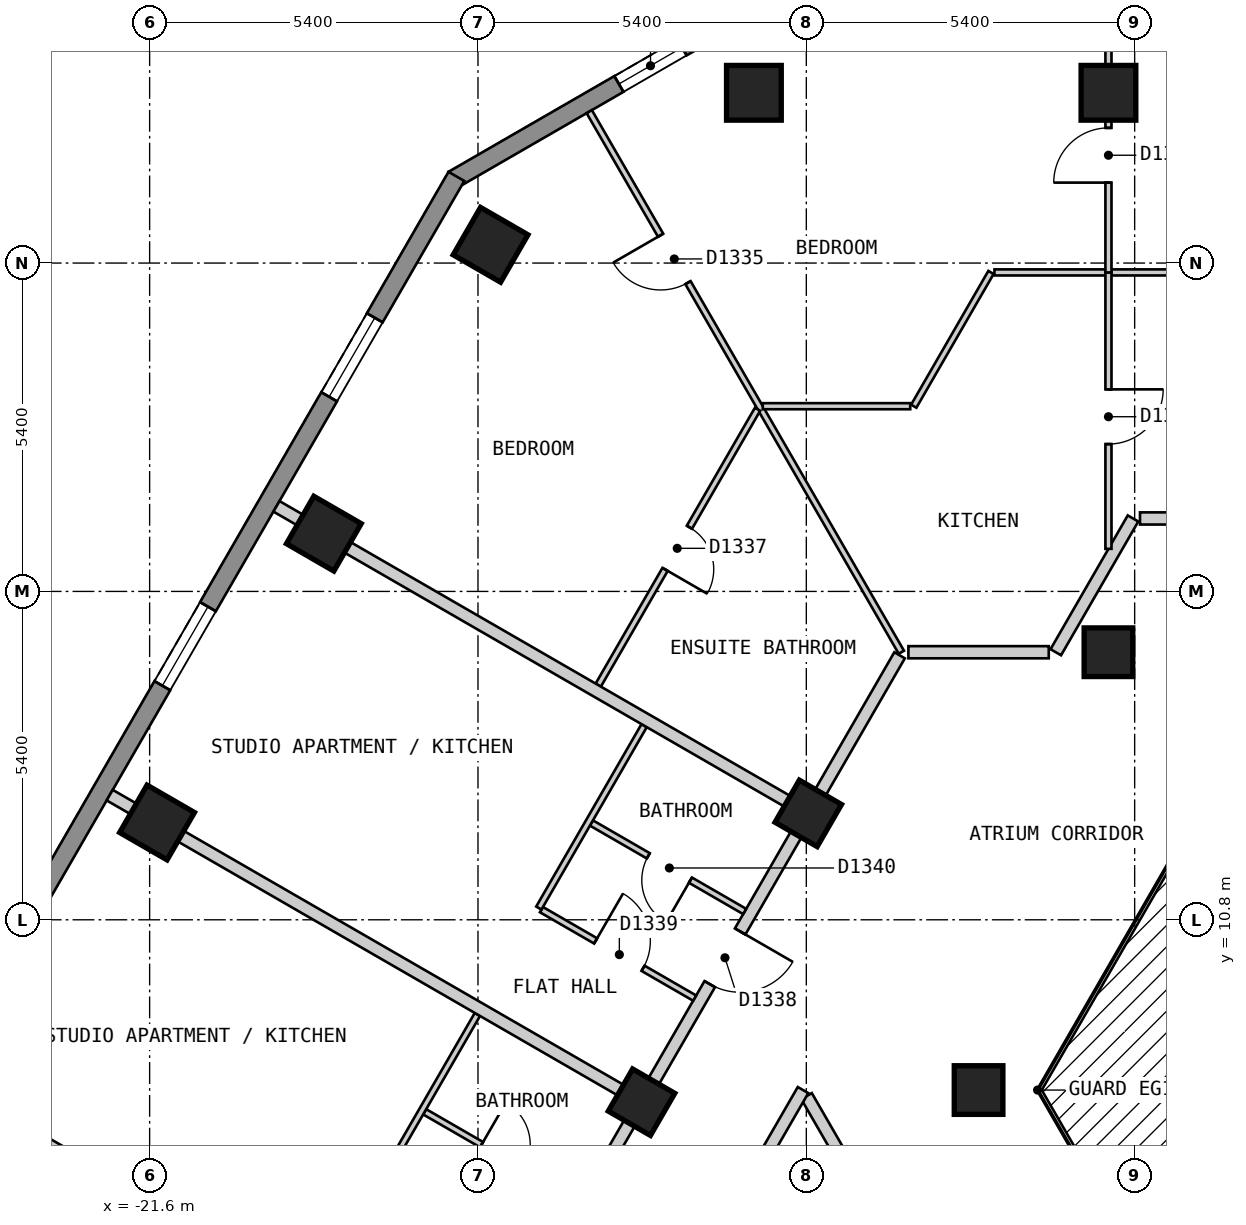
"""IFC4 building model, lengths in metres.
Left out: names, types, materials, properties, quantities, classifications, styles, units other than length and angle.
Written with IfcOpenShell. Run it as: python <this file> out.ifc"""

import sys

from ifc_helpers import new_model, si_unit, direction, frame, frame_2d, origin, origin_2d, place, context, subcontext, project, spatial, polyline, rectangle, outline, extrude, element, fill, save


model = new_model("IFC4")
c1 = context("Model", 3, precision=1e-05, world=origin(), true_north=direction((0.0, 1.0)))
c2 = subcontext(c1, "Body", "Model", "MODEL_VIEW")
j1 = project(units=[si_unit("LENGTHUNIT", "METRE"), si_unit("PLANEANGLEUNIT", "RADIAN")], contexts=[c1])
p1 = place(None, origin())
s1 = spatial("IfcSite", under=j1, at=p1, CompositionType="ELEMENT")
p2 = place(p1, origin())
s2 = spatial("IfcBuilding", under=s1, at=p2, CompositionType="ELEMENT")
p3 = place(p2, frame((0.0, 0.0, 147.6)))
s3 = spatial("IfcBuildingStorey", under=s2, at=p3, CompositionType="ELEMENT", Elevation=147.6)
for number, where, z_axis, x_axis in (
    (1, (-5.831, 24.4, 0.0), (0.0, 0.0, 1.0), (-1.0, 0.0, 0.0)),
    (2, (-11.662, 24.4, 0.0), (0.0, 0.0, 1.0), (-1.0, 0.0, 0.0)),
    (3, (-15.993, 21.9, 0.0), (0.0, 0.0, 1.0), (-0.5, -0.866, 0.0)),
    (4, (-18.735, 17.15, 0.0), (0.0, 0.0, 1.0), (-0.5, -0.866, 0.0)),
    (5, (-21.478, 12.4, 0.0), (0.0, 0.0, 1.0), (-0.5, -0.866, 0.0)),
):
    element("IfcColumn", number, at=place(p3, frame(where, z_axis=z_axis, x_axis=x_axis)), inside=s3, PredefinedType="COLUMN", context=c2, shape_type="SweptSolid", body=[
        extrude(rectangle(XDim=0.9, YDim=0.9, at=origin_2d()), origin(), (0.0, 0.0, 1.0), 3.0),
    ])
for number, where, z_axis, x_axis in (
    (6, (-5.831, 15.2, 0.0), (0.0, 0.0, 1.0), (-1.0, 0.0, 0.0)),
    (7, (-10.768, 12.55, 0.0), (0.0, 0.0, 1.0), (-0.5, -0.866, 0.0)),
    (8, (-7.967, 8.0, 0.0), (0.0, 0.0, 1.0), (1.0, 0.0, 0.0)),
    (9, (-13.51, 7.8, 0.0), (0.0, 0.0, 1.0), (-0.5, -0.866, 0.0)),
):
    element("IfcColumn", number, at=place(p3, frame(where, z_axis=z_axis, x_axis=x_axis)), inside=s3, PredefinedType="COLUMN", context=c2, shape_type="SweptSolid", body=[
        extrude(rectangle(XDim=0.8, YDim=0.8, at=origin_2d()), origin(), (0.0, 0.0, 1.0), 3.0),
    ])
p4 = place(p3, frame((-12.28, 25.47, 0.0), z_axis=(0.0, 0.0, 1.0), x_axis=(-0.866022959057, -0.500004234368, 0.0)))
e10 = element("IfcWall", 10, at=p4, inside=s3, PredefinedType="SOLIDWALL", context=c2, shape_type="SweptSolid", body=[
    extrude(outline(polyline([(0.0, -0.15), (5.0, -0.15), (4.92, 0.15), (0.08, 0.15), (0.0, -0.15)])), origin(), (0.0, 0.0, 1.0), 2.7),
])
p5 = place(p4, frame((0.65, 0.0, 0.15)))
e11 = element("IfcOpeningElement", 11, at=p5, cuts=e10, PredefinedType="OPENING", context=c2, shape_type="SweptSolid", body=[
    extrude(rectangle(XDim=1.2, YDim=2.1, at=frame_2d((0.6, 1.05))), frame((0.0, 0.16, 0.0), z_axis=(0.0, -1.0, 0.0), x_axis=(1.0, 0.0, 0.0)), (0.0, 0.0, 1.0), 0.32),
])
p6 = place(p3, frame((-16.555, 23.025, 0.0), z_axis=(0.0, 0.0, 1.0), x_axis=(-0.500020536353, -0.866013546791, 0.0)))
e12 = element("IfcWall", 12, at=p6, inside=s3, PredefinedType="SOLIDWALL", context=c2, shape_type="SweptSolid", body=[
    extrude(outline(polyline([(0.0, -0.15), (23.325, -0.15), (23.245, 0.15), (0.08, 0.15), (0.0, -0.15)])), origin(), (0.0, 0.0, 1.0), 2.7),
])
p7 = place(p6, frame((2.685, 0.0, 0.15)))
e13 = element("IfcOpeningElement", 13, at=p7, cuts=e12, PredefinedType="OPENING", context=c2, shape_type="SweptSolid", body=[
    extrude(rectangle(XDim=1.5, YDim=2.1, at=frame_2d((0.75, 1.05))), frame((0.0, 0.16, 0.0), z_axis=(0.0, -1.0, 0.0), x_axis=(1.0, 0.0, 0.0)), (0.0, 0.0, 1.0), 0.32),
])
p8 = place(p6, frame((8.171, 0.0, 0.15)))
e14 = element("IfcOpeningElement", 14, at=p8, cuts=e12, PredefinedType="OPENING", context=c2, shape_type="SweptSolid", body=[
    extrude(rectangle(XDim=1.5, YDim=2.1, at=frame_2d((0.75, 1.05))), frame((0.0, 0.16, 0.0), z_axis=(0.0, -1.0, 0.0), x_axis=(1.0, 0.0, 0.0)), (0.0, 0.0, 1.0), 0.32),
])
p9 = place(p6, frame((13.655, 0.0, 0.15)))
e15 = element("IfcOpeningElement", 15, at=p9, cuts=e12, PredefinedType="OPENING", context=c2, shape_type="SweptSolid", body=[
    extrude(rectangle(XDim=1.5, YDim=2.1, at=frame_2d((0.75, 1.05))), frame((0.0, 0.16, 0.0), z_axis=(0.0, -1.0, 0.0), x_axis=(1.0, 0.0, 0.0)), (0.0, 0.0, 1.0), 0.32),
])
p10 = place(p6, frame((19.14, 0.0, 0.15)))
e16 = element("IfcOpeningElement", 16, at=p10, cuts=e12, PredefinedType="OPENING", context=c2, shape_type="SweptSolid", body=[
    extrude(rectangle(XDim=1.5, YDim=2.1, at=frame_2d((0.75, 1.05))), frame((0.0, 0.16, 0.0), z_axis=(0.0, -1.0, 0.0), x_axis=(1.0, 0.0, 0.0)), (0.0, 0.0, 1.0), 0.32),
])
p11 = place(p3, frame((-10.796, 7.9, 0.0), z_axis=(0.0, 0.0, 1.0), x_axis=(0.499954271211, -0.866051803703, 0.0)))
e17 = element("IfcWall", 17, at=p11, inside=s3, PredefinedType="PARTITIONING", context=c2, shape_type="SweptSolid", body=[
    extrude(rectangle(XDim=7.536, YDim=0.2, at=frame_2d((3.768, 0.0))), origin(), (0.0, 0.0, 1.0), 2.7),
])
p12 = place(p3, frame((-9.121, 15.2, 0.0), z_axis=(0.0, 0.0, 1.0), x_axis=(1.0, 0.0, 0.0)))
e18 = element("IfcWall", 18, at=p12, inside=s3, PredefinedType="PARTITIONING", context=c2, shape_type="SweptSolid", body=[
    extrude(rectangle(XDim=2.308, YDim=0.2, at=frame_2d((1.154, 0.0))), origin(), (0.0, 0.0, 1.0), 2.7),
])
p13 = place(p3, frame((-5.312, 17.4, 0.0), z_axis=(0.0, 0.0, 1.0), x_axis=(1.0, 0.0, 0.0)))
e19 = element("IfcWall", 19, at=p13, inside=s3, PredefinedType="PARTITIONING", context=c2, shape_type="SweptSolid", body=[
    extrude(rectangle(XDim=10.739, YDim=0.2, at=frame_2d((5.37, 0.0))), origin(), (0.0, 0.0, 1.0), 2.7),
])
p14 = place(p13, frame((1.896, 0.0, 0.0)))
e20 = element("IfcOpeningElement", 20, at=p14, cuts=e19, PredefinedType="OPENING", context=c2, shape_type="SweptSolid", body=[
    extrude(rectangle(XDim=1.0, YDim=2.1, at=frame_2d((0.5, 1.05))), frame((0.0, 0.11, 0.0), z_axis=(0.0, -1.0, 0.0), x_axis=(1.0, 0.0, 0.0)), (0.0, 0.0, 1.0), 0.22),
])
p15 = place(p3, frame((-15.242, 0.399, 0.0), z_axis=(0.0, 0.0, 1.0), x_axis=(0.499953615651, 0.866052182145, 0.0)))
e21 = element("IfcWall", 21, at=p15, inside=s3, PredefinedType="PARTITIONING", context=c2, shape_type="SweptSolid", body=[
    extrude(rectangle(XDim=8.777, YDim=0.2, at=frame_2d((4.388, 0.0))), origin(), (0.0, 0.0, 1.0), 2.7),
])
p16 = place(p15, frame((3.938, 0.0, 0.0)))
e22 = element("IfcOpeningElement", 22, at=p16, cuts=e21, PredefinedType="OPENING", context=c2, shape_type="SweptSolid", body=[
    extrude(rectangle(XDim=0.9, YDim=2.1, at=frame_2d((0.45, 1.05))), frame((0.0, 0.11, 0.0), z_axis=(0.0, -1.0, 0.0), x_axis=(1.0, 0.0, 0.0)), (0.0, 0.0, 1.0), 0.22),
])
p17 = place(p3, frame((-6.697, 15.2, 0.0), z_axis=(0.0, 0.0, 1.0), x_axis=(0.499963722229, 0.866046347752, 0.0)))
e23 = element("IfcWall", 23, at=p17, inside=s3, PredefinedType="PARTITIONING", context=c2, shape_type="SweptSolid", body=[
    extrude(rectangle(XDim=2.54, YDim=0.2, at=frame_2d((1.27, 0.0))), origin(), (0.0, 0.0, 1.0), 2.7),
])
p18 = place(p3, frame((-17.724, 0.5, 0.0), z_axis=(0.0, 0.0, 1.0), x_axis=(0.499994801602, 0.86602840506, 0.0)))
e24 = element("IfcWall", 24, at=p18, inside=s3, PredefinedType="PARTITIONING", context=c2, shape_type="SweptSolid", body=[
    extrude(rectangle(XDim=16.916, YDim=0.2, at=frame_2d((8.458, 0.0))), origin(), (0.0, 0.0, 1.0), 2.7),
])
p19 = place(p18, frame((10.672, 0.0, 0.0)))
e25 = element("IfcOpeningElement", 25, at=p19, cuts=e24, PredefinedType="OPENING", context=c2, shape_type="SweptSolid", body=[
    extrude(rectangle(XDim=1.0, YDim=2.1, at=frame_2d((0.5, 1.05))), frame((0.0, 0.11, 0.0), z_axis=(0.0, -1.0, 0.0), x_axis=(1.0, 0.0, 0.0)), (0.0, 0.0, 1.0), 0.22),
])
p20 = place(p18, frame((5.187, 0.0, 0.0)))
e26 = element("IfcOpeningElement", 26, at=p20, cuts=e24, PredefinedType="OPENING", context=c2, shape_type="SweptSolid", body=[
    extrude(rectangle(XDim=1.0, YDim=2.1, at=frame_2d((0.5, 1.05))), frame((0.0, 0.11, 0.0), z_axis=(0.0, -1.0, 0.0), x_axis=(1.0, 0.0, 0.0)), (0.0, 0.0, 1.0), 0.22),
])
p21 = place(p18, frame((0.566, 0.0, 0.0)))
e27 = element("IfcOpeningElement", 27, at=p21, cuts=e24, PredefinedType="OPENING", context=c2, shape_type="SweptSolid", body=[
    extrude(rectangle(XDim=1.0, YDim=2.1, at=frame_2d((0.5, 1.05))), frame((0.0, 0.11, 0.0), z_axis=(0.0, -1.0, 0.0), x_axis=(1.0, 0.0, 0.0)), (0.0, 0.0, 1.0), 0.22),
])
p22 = place(p3, frame((-14.37, 24.09, 0.0), z_axis=(0.0, 0.0, 1.0), x_axis=(0.50002438799, -0.866011322914, 0.0)))
e28 = element("IfcWall", 28, at=p22, inside=s3, PredefinedType="PARTITIONING", context=c2, shape_type="SweptSolid", body=[
    extrude(rectangle(XDim=10.266, YDim=0.1, at=frame_2d((5.133, 0.0))), origin(), (0.0, 0.0, 1.0), 2.7),
])
p23 = place(p22, frame((2.347, 0.0, 0.0)))
e29 = element("IfcOpeningElement", 29, at=p23, cuts=e28, PredefinedType="OPENING", context=c2, shape_type="SweptSolid", body=[
    extrude(rectangle(XDim=0.9, YDim=2.1, at=frame_2d((0.45, 1.05))), frame((0.0, 0.06, 0.0), z_axis=(0.0, -1.0, 0.0), x_axis=(1.0, 0.0, 0.0)), (0.0, 0.0, 1.0), 0.12),
])
p24 = place(p3, frame((-17.076, 7.642, 0.0), z_axis=(0.0, 0.0, 1.0), x_axis=(0.866003949776, -0.500037157592, 0.0)))
e30 = element("IfcWall", 30, at=p24, inside=s3, PredefinedType="PARTITIONING", context=c2, shape_type="SweptSolid", body=[
    extrude(rectangle(XDim=2.91, YDim=0.1, at=frame_2d((1.455, 0.0))), origin(), (0.0, 0.0, 1.0), 2.7),
])
p25 = place(p24, frame((1.08, 0.0, 0.0)))
e31 = element("IfcOpeningElement", 31, at=p25, cuts=e30, PredefinedType="OPENING", context=c2, shape_type="SweptSolid", body=[
    extrude(rectangle(XDim=0.8, YDim=2.1, at=frame_2d((0.4, 1.05))), frame((0.0, 0.06, 0.0), z_axis=(0.0, -1.0, 0.0), x_axis=(1.0, 0.0, 0.0)), (0.0, 0.0, 1.0), 0.12),
])
p26 = place(p3, frame((-14.334, 12.392, 0.0), z_axis=(0.0, 0.0, 1.0), x_axis=(0.866003949776, -0.500037157592, 0.0)))
e32 = element("IfcWall", 32, at=p26, inside=s3, PredefinedType="PARTITIONING", context=c2, shape_type="SweptSolid", body=[
    extrude(rectangle(XDim=2.91, YDim=0.1, at=frame_2d((1.455, 0.0))), origin(), (0.0, 0.0, 1.0), 2.7),
])
p27 = place(p26, frame((1.08, 0.0, 0.0)))
e33 = element("IfcOpeningElement", 33, at=p27, cuts=e32, PredefinedType="OPENING", context=c2, shape_type="SweptSolid", body=[
    extrude(rectangle(XDim=0.8, YDim=2.1, at=frame_2d((0.4, 1.05))), frame((0.0, 0.06, 0.0), z_axis=(0.0, -1.0, 0.0), x_axis=(1.0, 0.0, 0.0)), (0.0, 0.0, 1.0), 0.12),
])
p28 = place(p3, frame((-15.156, 10.967, 0.0), z_axis=(0.0, 0.0, 1.0), x_axis=(0.866003949776, -0.500037157592, 0.0)))
e34 = element("IfcWall", 34, at=p28, inside=s3, PredefinedType="PARTITIONING", context=c2, shape_type="SweptSolid", body=[
    extrude(rectangle(XDim=2.91, YDim=0.1, at=frame_2d((1.455, 0.0))), origin(), (0.0, 0.0, 1.0), 2.7),
])
p29 = place(p28, frame((1.029, 0.0, 0.0)))
e35 = element("IfcOpeningElement", 35, at=p29, cuts=e34, PredefinedType="OPENING", context=c2, shape_type="SweptSolid", body=[
    extrude(rectangle(XDim=0.9, YDim=2.1, at=frame_2d((0.45, 1.05))), frame((0.0, 0.06, 0.0), z_axis=(0.0, -1.0, 0.0), x_axis=(1.0, 0.0, 0.0)), (0.0, 0.0, 1.0), 0.12),
])
p30 = place(p3, frame((-11.516, 19.246, 0.0), z_axis=(0.0, 0.0, 1.0), x_axis=(1.0, 0.0, 0.0)))
e36 = element("IfcWall", 36, at=p30, inside=s3, PredefinedType="PARTITIONING", context=c2, shape_type="SweptSolid", body=[
    extrude(rectangle(XDim=2.425, YDim=0.1, at=frame_2d((1.212, 0.0))), origin(), (0.0, 0.0, 1.0), 2.7),
])
p31 = place(p3, frame((-7.706, 21.446, 0.0), z_axis=(0.0, 0.0, 1.0), x_axis=(1.0, 0.0, 0.0)))
e37 = element("IfcWall", 37, at=p31, inside=s3, PredefinedType="PARTITIONING", context=c2, shape_type="SweptSolid", body=[
    extrude(rectangle(XDim=15.469, YDim=0.1, at=frame_2d((7.734, 0.0))), origin(), (0.0, 0.0, 1.0), 2.7),
])
p32 = place(p31, frame((4.35, 0.0, 0.0)))
e38 = element("IfcOpeningElement", 38, at=p32, cuts=e37, PredefinedType="OPENING", context=c2, shape_type="SweptSolid", body=[
    extrude(rectangle(XDim=0.9, YDim=2.1, at=frame_2d((0.45, 1.05))), frame((0.0, 0.06, 0.0), z_axis=(0.0, -1.0, 0.0), x_axis=(1.0, 0.0, 0.0)), (0.0, 0.0, 1.0), 0.12),
])
p33 = place(p3, frame((-9.033, 19.246, 0.0), z_axis=(0.0, 0.0, 1.0), x_axis=(0.499963722229, 0.866046347752, 0.0)))
e39 = element("IfcWall", 39, at=p33, inside=s3, PredefinedType="PARTITIONING", context=c2, shape_type="SweptSolid", body=[
    extrude(rectangle(XDim=2.54, YDim=0.1, at=frame_2d((1.27, 0.0))), origin(), (0.0, 0.0, 1.0), 2.7),
])
p34 = place(p3, frame((-17.942, 6.243, 0.0), z_axis=(0.0, 0.0, 1.0), x_axis=(0.49997462182, 0.866040055388, 0.0)))
e40 = element("IfcWall", 40, at=p34, inside=s3, PredefinedType="PARTITIONING", context=c2, shape_type="SweptSolid", body=[
    extrude(rectangle(XDim=3.464, YDim=0.1, at=frame_2d((1.732, 0.0))), origin(), (0.0, 0.0, 1.0), 2.7),
])
p35 = place(p3, frame((-15.199, 10.993, 0.0), z_axis=(0.0, 0.0, 1.0), x_axis=(0.499885210257, 0.866091667531, 0.0)))
e41 = element("IfcWall", 41, at=p35, inside=s3, PredefinedType="PARTITIONING", context=c2, shape_type="SweptSolid", body=[
    extrude(rectangle(XDim=3.463, YDim=0.1, at=frame_2d((1.731, 0.0))), origin(), (0.0, 0.0, 1.0), 2.7),
])
p36 = place(p3, frame((-14.222, 14.659, 0.0), z_axis=(0.0, 0.0, 1.0), x_axis=(0.500053212623, 0.865994679283, 0.0)))
e42 = element("IfcWall", 42, at=p36, inside=s3, PredefinedType="PARTITIONING", context=c2, shape_type="SweptSolid", body=[
    extrude(rectangle(XDim=5.239, YDim=0.1, at=frame_2d((2.62, 0.0))), origin(), (0.0, 0.0, 1.0), 2.7),
])
p37 = place(p36, frame((2.198, 0.0, 0.0)))
e43 = element("IfcOpeningElement", 43, at=p37, cuts=e42, PredefinedType="OPENING", context=c2, shape_type="SweptSolid", body=[
    extrude(rectangle(XDim=0.8, YDim=2.1, at=frame_2d((0.4, 1.05))), frame((0.0, 0.06, 0.0), z_axis=(0.0, -1.0, 0.0), x_axis=(1.0, 0.0, 0.0)), (0.0, 0.0, 1.0), 0.12),
])
p38 = place(p3, frame((-5.831, 16.9, 0.0), z_axis=(0.0, 0.0, 1.0), x_axis=(0.0, 1.0, 0.0)))
e44 = element("IfcWall", 44, at=p38, inside=s3, PredefinedType="PARTITIONING", context=c2, shape_type="SweptSolid", body=[
    extrude(rectangle(XDim=4.546, YDim=0.1, at=frame_2d((2.273, 0.0))), origin(), (0.0, 0.0, 1.0), 2.7),
])
p39 = place(p38, frame((1.723, 0.0, 0.0)))
e45 = element("IfcOpeningElement", 45, at=p39, cuts=e44, PredefinedType="OPENING", context=c2, shape_type="SweptSolid", body=[
    extrude(rectangle(XDim=0.9, YDim=2.1, at=frame_2d((0.45, 1.05))), frame((0.0, 0.06, 0.0), z_axis=(0.0, -1.0, 0.0), x_axis=(1.0, 0.0, 0.0)), (0.0, 0.0, 1.0), 0.12),
])
p40 = place(p3, frame((-24.999, 8.1, 0.0), z_axis=(0.0, 0.0, 1.0), x_axis=(0.866016855193, -0.500014806302, 0.0)))
e46 = element("IfcWall", 46, at=p40, inside=s3, PredefinedType="PARTITIONING", context=c2, shape_type="SweptSolid", body=[
    extrude(rectangle(XDim=10.0, YDim=0.2, at=frame_2d((5.0, 0.0))), origin(), (0.0, 0.0, 1.0), 2.7),
])
p41 = place(p3, frame((-22.257, 12.85, 0.0), z_axis=(0.0, 0.0, 1.0), x_axis=(0.866047370643, -0.499961950354, 0.0)))
e47 = element("IfcWall", 47, at=p41, inside=s3, PredefinedType="PARTITIONING", context=c2, shape_type="SweptSolid", body=[
    extrude(rectangle(XDim=10.001, YDim=0.2, at=frame_2d((5.0, 0.0))), origin(), (0.0, 0.0, 1.0), 2.7),
])
p42 = place(p3, frame((-19.514, 17.599, 0.0), z_axis=(0.0, 0.0, 1.0), x_axis=(0.866059142644, -0.499941558027, 0.0)))
e48 = element("IfcWall", 48, at=p42, inside=s3, PredefinedType="PARTITIONING", context=c2, shape_type="SweptSolid", body=[
    extrude(rectangle(XDim=9.999, YDim=0.2, at=frame_2d((5.0, 0.0))), origin(), (0.0, 0.0, 1.0), 2.7),
])
p43 = place(p3, frame((-5.831, 21.446, 0.0), z_axis=(0.0, 0.0, 1.0), x_axis=(0.0, 1.0, 0.0)))
e49 = element("IfcWall", 49, at=p43, inside=s3, PredefinedType="PARTITIONING", context=c2, shape_type="SweptSolid", body=[
    extrude(rectangle(XDim=3.854, YDim=0.1, at=frame_2d((1.927, 0.0))), origin(), (0.0, 0.0, 1.0), 2.7),
])
p44 = place(p43, frame((1.477, 0.0, 0.0)))
e50 = element("IfcOpeningElement", 50, at=p44, cuts=e49, PredefinedType="OPENING", context=c2, shape_type="SweptSolid", body=[
    extrude(rectangle(XDim=0.9, YDim=2.1, at=frame_2d((0.45, 1.05))), frame((0.0, 0.06, 0.0), z_axis=(0.0, -1.0, 0.0), x_axis=(1.0, 0.0, 0.0)), (0.0, 0.0, 1.0), 0.12),
])
p45 = place(p5, origin())
e51 = element("IfcWindow", 51, at=p45, inside=s3, PartitioningType="SINGLE_PANEL", PredefinedType="WINDOW", context=c2, shape_type="SweptSolid", body=[
    extrude(rectangle(XDim=1.2, YDim=2.1, at=frame_2d((0.6, 1.05))), frame((0.0, 0.03, 0.0), z_axis=(0.0, -1.0, 0.0), x_axis=(1.0, 0.0, 0.0)), (0.0, 0.0, 1.0), 0.06),
])
fill(e11, e51)
p46 = place(p7, origin())
e52 = element("IfcWindow", 52, at=p46, inside=s3, PartitioningType="SINGLE_PANEL", PredefinedType="WINDOW", context=c2, shape_type="SweptSolid", body=[
    extrude(rectangle(XDim=1.5, YDim=2.1, at=frame_2d((0.75, 1.05))), frame((0.0, 0.03, 0.0), z_axis=(0.0, -1.0, 0.0), x_axis=(1.0, 0.0, 0.0)), (0.0, 0.0, 1.0), 0.06),
])
fill(e13, e52)
p47 = place(p8, origin())
e53 = element("IfcWindow", 53, at=p47, inside=s3, PartitioningType="SINGLE_PANEL", PredefinedType="WINDOW", context=c2, shape_type="SweptSolid", body=[
    extrude(rectangle(XDim=1.5, YDim=2.1, at=frame_2d((0.75, 1.05))), frame((0.0, 0.03, 0.0), z_axis=(0.0, -1.0, 0.0), x_axis=(1.0, 0.0, 0.0)), (0.0, 0.0, 1.0), 0.06),
])
fill(e14, e53)
p48 = place(p39, origin())
e54 = element("IfcDoor", 54, at=p48, inside=s3, OperationType="SINGLE_SWING_RIGHT", PredefinedType="DOOR", context=c2, shape_type="SweptSolid", body=[
    extrude(rectangle(XDim=0.9, YDim=2.1, at=frame_2d((0.45, 1.05))), frame((0.0, 0.025, 0.0), z_axis=(0.0, -1.0, 0.0), x_axis=(1.0, 0.0, 0.0)), (0.0, 0.0, 1.0), 0.05),
])
fill(e45, e54)
p49 = place(p44, origin())
e55 = element("IfcDoor", 55, at=p49, inside=s3, OperationType="SINGLE_SWING_LEFT", PredefinedType="DOOR", context=c2, shape_type="SweptSolid", body=[
    extrude(rectangle(XDim=0.9, YDim=2.1, at=frame_2d((0.45, 1.05))), frame((0.0, 0.025, 0.0), z_axis=(0.0, -1.0, 0.0), x_axis=(1.0, 0.0, 0.0)), (0.0, 0.0, 1.0), 0.05),
])
fill(e50, e55)
p50 = place(p23, origin())
e56 = element("IfcDoor", 56, at=p50, inside=s3, OperationType="SINGLE_SWING_LEFT", PredefinedType="DOOR", context=c2, shape_type="SweptSolid", body=[
    extrude(rectangle(XDim=0.9, YDim=2.1, at=frame_2d((0.45, 1.05))), frame((0.0, 0.025, 0.0), z_axis=(0.0, -1.0, 0.0), x_axis=(1.0, 0.0, 0.0)), (0.0, 0.0, 1.0), 0.05),
])
fill(e29, e56)
p51 = place(p37, origin())
e57 = element("IfcDoor", 57, at=p51, inside=s3, OperationType="SINGLE_SWING_LEFT", PredefinedType="DOOR", context=c2, shape_type="SweptSolid", body=[
    extrude(rectangle(XDim=0.8, YDim=2.1, at=frame_2d((0.4, 1.05))), frame((0.0, 0.025, 0.0), z_axis=(0.0, -1.0, 0.0), x_axis=(1.0, 0.0, 0.0)), (0.0, 0.0, 1.0), 0.05),
])
fill(e43, e57)
p52 = place(p19, origin())
e58 = element("IfcDoor", 58, at=p52, inside=s3, OperationType="SINGLE_SWING_RIGHT", PredefinedType="DOOR", context=c2, shape_type="SweptSolid", body=[
    extrude(rectangle(XDim=1.0, YDim=2.1, at=frame_2d((0.5, 1.05))), frame((0.0, 0.025, 0.0), z_axis=(0.0, -1.0, 0.0), x_axis=(1.0, 0.0, 0.0)), (0.0, 0.0, 1.0), 0.05),
])
fill(e25, e58)
p53 = place(p29, origin())
e59 = element("IfcDoor", 59, at=p53, inside=s3, OperationType="SINGLE_SWING_LEFT", PredefinedType="DOOR", context=c2, shape_type="SweptSolid", body=[
    extrude(rectangle(XDim=0.9, YDim=2.1, at=frame_2d((0.45, 1.05))), frame((0.0, 0.025, 0.0), z_axis=(0.0, -1.0, 0.0), x_axis=(1.0, 0.0, 0.0)), (0.0, 0.0, 1.0), 0.05),
])
fill(e35, e59)
p54 = place(p27, origin())
e60 = element("IfcDoor", 60, at=p54, inside=s3, OperationType="SINGLE_SWING_RIGHT", PredefinedType="DOOR", context=c2, shape_type="SweptSolid", body=[
    extrude(rectangle(XDim=0.8, YDim=2.1, at=frame_2d((0.4, 1.05))), frame((0.0, 0.025, 0.0), z_axis=(0.0, -1.0, 0.0), x_axis=(1.0, 0.0, 0.0)), (0.0, 0.0, 1.0), 0.05),
])
fill(e33, e60)
p55 = place(p25, origin())
e61 = element("IfcDoor", 61, at=p55, inside=s3, OperationType="SINGLE_SWING_LEFT", PredefinedType="DOOR", context=c2, shape_type="SweptSolid", body=[
    extrude(rectangle(XDim=0.8, YDim=2.1, at=frame_2d((0.4, 1.05))), frame((0.0, 0.025, 0.0), z_axis=(0.0, -1.0, 0.0), x_axis=(1.0, 0.0, 0.0)), (0.0, 0.0, 1.0), 0.05),
])
fill(e31, e61)
save(model, sys.argv[1])
